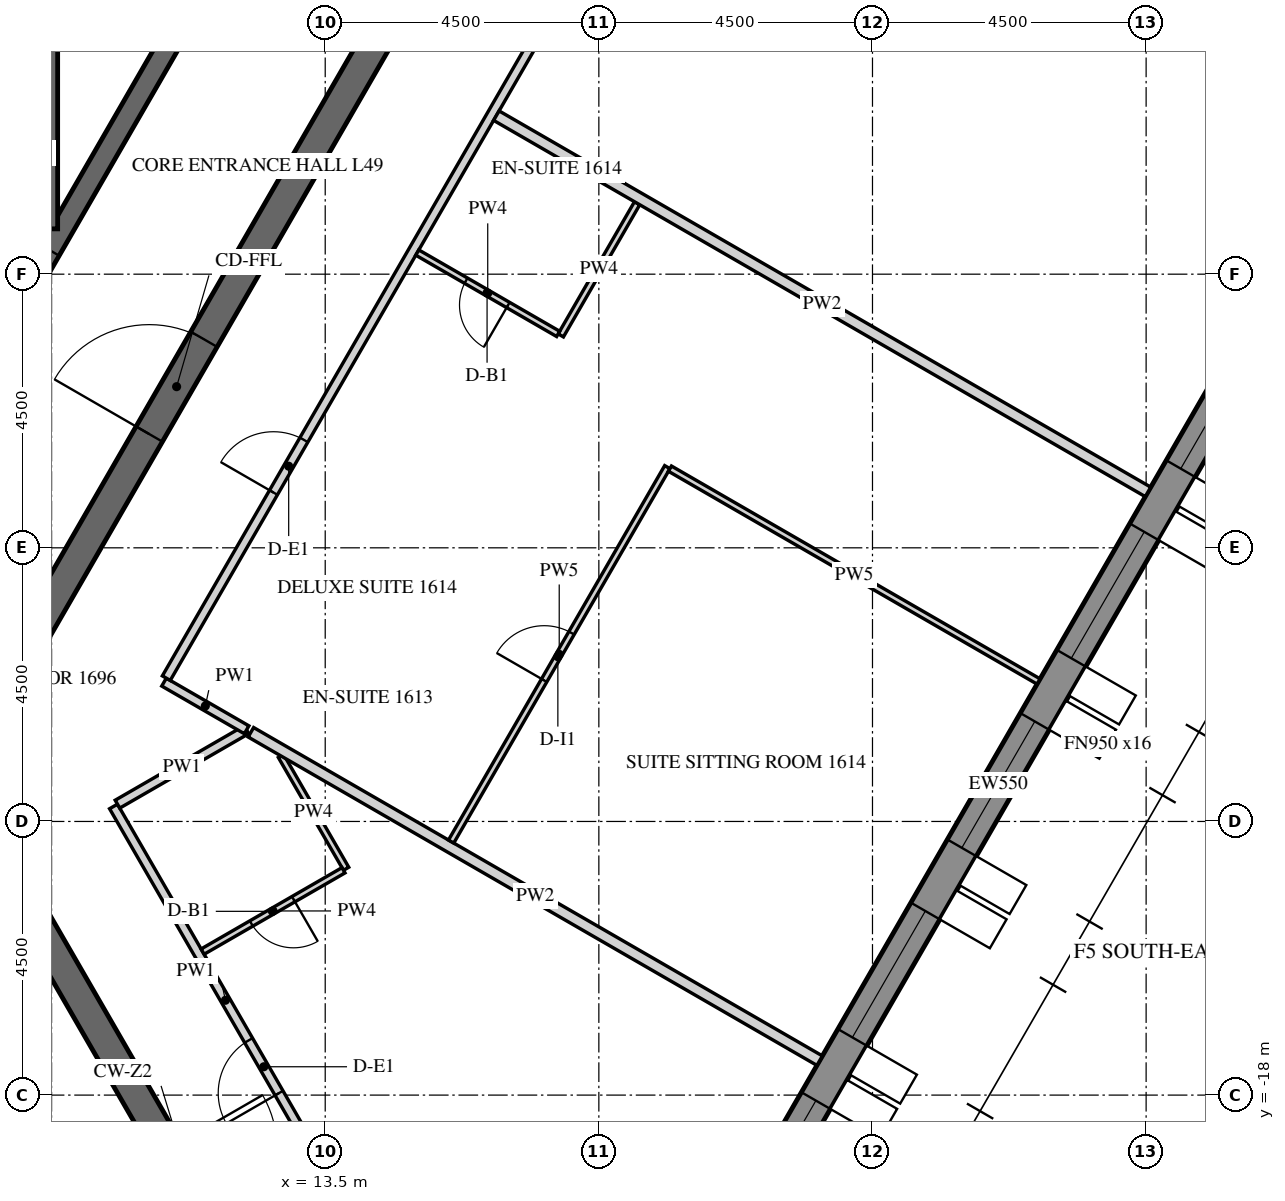
"""IFC4 building model, lengths in metres.
Left out: names, types, materials, properties, quantities, classifications, styles, units other than length and angle.
Written with IfcOpenShell. Run it as: python <this file> out.ifc"""

import sys

from ifc_helpers import new_model, si_unit, direction, frame, frame_2d, origin, place, context, subcontext, project, spatial, polyline, rectangle, outline, extrude, element, fill, save


model = new_model("IFC4")
c1 = context("Model", 3, precision=1e-05, world=origin(), true_north=direction((0.0, 1.0)))
c2 = subcontext(c1, "Body", "Model", "MODEL_VIEW")
j1 = project(units=[si_unit("LENGTHUNIT", "METRE"), si_unit("PLANEANGLEUNIT", "RADIAN")], contexts=[c1])
p1 = place(None, origin())
s1 = spatial("IfcSite", under=j1, at=p1, CompositionType="ELEMENT")
p2 = place(p1, origin())
s2 = spatial("IfcBuilding", under=s1, at=p2, CompositionType="ELEMENT")
p3 = place(p2, frame((0.0, 0.0, 207.3)))
s3 = spatial("IfcBuildingStorey", under=s2, at=p3, CompositionType="ELEMENT", Elevation=207.3)
p4 = place(p3, frame((17.63, -24.914, -0.15), z_axis=(0.0, 0.0, 1.0), x_axis=(0.499998569178, 0.866026229868, 0.0)))
e1 = element("IfcWall", 1, at=p4, inside=s3, PredefinedType="SOLIDWALL", context=c2, shape_type="SweptSolid", body=[
    extrude(outline(polyline([(-0.022, -0.275), (27.783, -0.275), (27.732, 0.275), (0.022, 0.275), (-0.022, -0.275)])), origin(), (0.0, 0.0, 1.0), 3.9),
])
p5 = place(p4, frame((1.879, 0.0, 1.05)))
e2 = element("IfcOpeningElement", 2, at=p5, cuts=e1, PredefinedType="OPENING", context=c2, shape_type="SweptSolid", body=[
    extrude(rectangle(XDim=2.4, YDim=2.4, at=frame_2d((1.2, 1.2))), frame((0.0, 0.285, 0.0), z_axis=(0.0, -1.0, 0.0), x_axis=(1.0, 0.0, 0.0)), (0.0, 0.0, 1.0), 0.57),
])
p6 = place(p4, frame((5.479, 0.0, 1.05)))
e3 = element("IfcOpeningElement", 3, at=p6, cuts=e1, PredefinedType="OPENING", context=c2, shape_type="SweptSolid", body=[
    extrude(rectangle(XDim=2.4, YDim=2.4, at=frame_2d((1.2, 1.2))), frame((0.0, 0.285, 0.0), z_axis=(0.0, -1.0, 0.0), x_axis=(1.0, 0.0, 0.0)), (0.0, 0.0, 1.0), 0.57),
])
p7 = place(p4, frame((9.079, 0.0, 1.05)))
e4 = element("IfcOpeningElement", 4, at=p7, cuts=e1, PredefinedType="OPENING", context=c2, shape_type="SweptSolid", body=[
    extrude(rectangle(XDim=2.4, YDim=2.4, at=frame_2d((1.2, 1.2))), frame((0.0, 0.285, 0.0), z_axis=(0.0, -1.0, 0.0), x_axis=(1.0, 0.0, 0.0)), (0.0, 0.0, 1.0), 0.57),
])
p8 = place(p4, frame((12.679, 0.0, 1.05)))
e5 = element("IfcOpeningElement", 5, at=p8, cuts=e1, PredefinedType="OPENING", context=c2, shape_type="SweptSolid", body=[
    extrude(rectangle(XDim=2.4, YDim=2.4, at=frame_2d((1.2, 1.2))), frame((0.0, 0.285, 0.0), z_axis=(0.0, -1.0, 0.0), x_axis=(1.0, 0.0, 0.0)), (0.0, 0.0, 1.0), 0.57),
])
p9 = place(p4, frame((16.279, 0.0, 1.05)))
e6 = element("IfcOpeningElement", 6, at=p9, cuts=e1, PredefinedType="OPENING", context=c2, shape_type="SweptSolid", body=[
    extrude(rectangle(XDim=2.4, YDim=2.4, at=frame_2d((1.2, 1.2))), frame((0.0, 0.285, 0.0), z_axis=(0.0, -1.0, 0.0), x_axis=(1.0, 0.0, 0.0)), (0.0, 0.0, 1.0), 0.57),
])
p10 = place(p4, frame((19.879, 0.0, 1.05)))
e7 = element("IfcOpeningElement", 7, at=p10, cuts=e1, PredefinedType="OPENING", context=c2, shape_type="SweptSolid", body=[
    extrude(rectangle(XDim=2.4, YDim=2.4, at=frame_2d((1.2, 1.2))), frame((0.0, 0.285, 0.0), z_axis=(0.0, -1.0, 0.0), x_axis=(1.0, 0.0, 0.0)), (0.0, 0.0, 1.0), 0.57),
])
p11 = place(p4, frame((23.479, 0.0, 1.05)))
e8 = element("IfcOpeningElement", 8, at=p11, cuts=e1, PredefinedType="OPENING", context=c2, shape_type="SweptSolid", body=[
    extrude(rectangle(XDim=2.4, YDim=2.4, at=frame_2d((1.2, 1.2))), frame((0.0, 0.285, 0.0), z_axis=(0.0, -1.0, 0.0), x_axis=(1.0, 0.0, 0.0)), (0.0, 0.0, 1.0), 0.57),
])
p12 = place(p3, frame((7.361, -12.75, -0.15), z_axis=(0.0, 0.0, 1.0), x_axis=(0.50000571537, 0.866022103989, 0.0)))
e9 = element("IfcWall", 9, at=p12, inside=s3, PredefinedType="SHEAR", context=c2, shape_type="SweptSolid", body=[
    extrude(outline(polyline([(-0.144, -0.25), (14.867, -0.25), (14.578, 0.25), (0.144, 0.25), (-0.144, -0.25)])), origin(), (0.0, 0.0, 1.0), 3.9),
])
p13 = place(p12, frame((6.49, 0.0, 0.15)))
e10 = element("IfcOpeningElement", 10, at=p13, cuts=e9, PredefinedType="OPENING", context=c2, shape_type="SweptSolid", body=[
    extrude(rectangle(XDim=1.8, YDim=2.4, at=frame_2d((0.9, 1.2))), frame((0.0, 0.26, 0.0), z_axis=(0.0, -1.0, 0.0), x_axis=(1.0, 0.0, 0.0)), (0.0, 0.0, 1.0), 0.52),
])
p14 = place(p3, frame((7.506, -13.0, -0.15), z_axis=(0.0, 0.0, 1.0), x_axis=(0.499988271576, -0.866032175087, 0.0)))
e11 = element("IfcWall", 11, at=p14, inside=s3, PredefinedType="SHEAR", context=c2, shape_type="SweptSolid", body=[
    extrude(rectangle(XDim=15.424, YDim=0.5, at=frame_2d((7.712, 0.0))), origin(), (0.0, 0.0, 1.0), 3.9),
])
p15 = place(p14, frame((6.812, 0.0, 0.15)))
e12 = element("IfcOpeningElement", 12, at=p15, cuts=e11, PredefinedType="OPENING", context=c2, shape_type="SweptSolid", body=[
    extrude(rectangle(XDim=1.8, YDim=2.4, at=frame_2d((0.9, 1.2))), frame((0.0, 0.26, 0.0), z_axis=(0.0, -1.0, 0.0), x_axis=(1.0, 0.0, 0.0)), (0.0, 0.0, 1.0), 0.52),
])
p16 = place(p3, frame((5.673, -9.825, -0.15), z_axis=(0.0, 0.0, 1.0), x_axis=(0.499995046907, 0.866028263435, 0.0)))
e13 = element("IfcWall", 13, at=p16, inside=s3, PredefinedType="SHEAR", context=c2, shape_type="SweptSolid", body=[
    extrude(outline(polyline([(-0.101, -0.175), (11.446, -0.175), (11.244, 0.175), (0.101, 0.175), (-0.101, -0.175)])), origin(), (0.0, 0.0, 1.0), 3.9),
])
p17 = place(p16, frame((4.801, 0.0, 0.15)))
e14 = element("IfcOpeningElement", 14, at=p17, cuts=e13, PredefinedType="OPENING", context=c2, shape_type="SweptSolid", body=[
    extrude(rectangle(XDim=1.8, YDim=2.4, at=frame_2d((0.9, 1.2))), frame((0.0, 0.185, 0.0), z_axis=(0.0, -1.0, 0.0), x_axis=(1.0, 0.0, 0.0)), (0.0, 0.0, 1.0), 0.37),
])
p18 = place(p3, frame((8.975, -3.755, -0.25), z_axis=(0.0, 0.0, 1.0), x_axis=(0.0, 1.0, 0.0)))
e15 = element("IfcWall", 15, at=p18, inside=s3, PredefinedType="SHEAR", context=c2, shape_type="SweptSolid", body=[
    extrude(rectangle(XDim=7.51, YDim=0.25, at=frame_2d((3.755, 0.0))), origin(), (0.0, 0.0, 1.0), 3.9),
])
p19 = place(p3, frame((6.293, -15.0, 0.0), z_axis=(0.0, 0.0, 1.0), x_axis=(0.499980313799, -0.86603676932, 0.0)))
e16 = element("IfcWall", 16, at=p19, inside=s3, PredefinedType="PARTITIONING", context=c2, shape_type="SweptSolid", body=[
    extrude(rectangle(XDim=7.786, YDim=0.15, at=frame_2d((3.893, 0.0))), origin(), (0.0, 0.0, 1.0), 2.988),
])
p20 = place(p3, frame((13.699, -19.628, 0.0), z_axis=(0.0, 0.0, 1.0), x_axis=(-0.499995202058, 0.86602817386, 0.0)))
e17 = element("IfcWall", 17, at=p20, inside=s3, PredefinedType="PARTITIONING", context=c2, shape_type="SweptSolid", body=[
    extrude(rectangle(XDim=7.361, YDim=0.15, at=frame_2d((3.68, 0.0))), origin(), (0.0, 0.0, 1.0), 2.988),
])
p21 = place(p20, frame((1.918, 0.0, 0.0)))
e18 = element("IfcOpeningElement", 18, at=p21, cuts=e17, PredefinedType="OPENING", context=c2, shape_type="SweptSolid", body=[
    extrude(rectangle(XDim=1.0, YDim=2.1, at=frame_2d((0.5, 1.05))), frame((0.0, 0.085, 0.0), z_axis=(0.0, -1.0, 0.0), x_axis=(1.0, 0.0, 0.0)), (0.0, 0.0, 1.0), 0.17),
])
p22 = place(p3, frame((10.084, -13.216, 0.0), z_axis=(0.0, 0.0, 1.0), x_axis=(0.866026229868, 0.499998569178, 0.0)))
e19 = element("IfcWall", 19, at=p22, inside=s3, PredefinedType="PARTITIONING", context=c2, shape_type="SweptSolid", body=[
    extrude(rectangle(XDim=2.449, YDim=0.15, at=frame_2d((1.225, 0.0))), origin(), (0.0, 0.0, 1.0), 2.988),
])
p23 = place(p3, frame((12.208, -11.993, 0.0), z_axis=(0.0, 0.0, 1.0), x_axis=(-0.866011891242, 0.50002340368, 0.0)))
e20 = element("IfcWall", 20, at=p23, inside=s3, PredefinedType="PARTITIONING", context=c2, shape_type="SweptSolid", body=[
    extrude(rectangle(XDim=1.568, YDim=0.15, at=frame_2d((0.784, 0.0))), origin(), (0.0, 0.0, 1.0), 2.988),
])
p24 = place(p3, frame((10.887, -11.144, 0.0), z_axis=(0.0, 0.0, 1.0), x_axis=(0.500006037985, 0.866021917724, 0.0)))
e21 = element("IfcWall", 21, at=p24, inside=s3, PredefinedType="PARTITIONING", context=c2, shape_type="SweptSolid", body=[
    extrude(rectangle(XDim=12.867, YDim=0.15, at=frame_2d((6.434, 0.0))), origin(), (0.0, 0.0, 1.0), 2.988),
])
p25 = place(p24, frame((3.525, 0.0, 0.0)))
e22 = element("IfcOpeningElement", 22, at=p25, cuts=e21, PredefinedType="OPENING", context=c2, shape_type="SweptSolid", body=[
    extrude(rectangle(XDim=1.0, YDim=2.1, at=frame_2d((0.5, 1.05))), frame((0.0, 0.085, 0.0), z_axis=(0.0, -1.0, 0.0), x_axis=(1.0, 0.0, 0.0)), (0.0, 0.0, 1.0), 0.17),
])
p26 = place(p3, frame((12.772, -12.423, 0.0), z_axis=(0.0, 0.0, 1.0), x_axis=(0.500061136393, -0.865990103794, 0.0)))
e23 = element("IfcWall", 23, at=p26, inside=s3, PredefinedType="PARTITIONING", context=c2, shape_type="SweptSolid", body=[
    extrude(rectangle(XDim=2.142, YDim=0.1, at=frame_2d((1.071, 0.0))), origin(), (0.0, 0.0, 1.0), 2.988),
])
p27 = place(p3, frame((13.8, -14.303, 0.0), z_axis=(0.0, 0.0, 1.0), x_axis=(-0.866021425885, -0.500006889861, 0.0)))
e24 = element("IfcWall", 24, at=p27, inside=s3, PredefinedType="PARTITIONING", context=c2, shape_type="SweptSolid", body=[
    extrude(rectangle(XDim=2.675, YDim=0.1, at=frame_2d((1.337, 0.0))), origin(), (0.0, 0.0, 1.0), 2.988),
])
p28 = place(p27, frame((0.95, 0.0, 0.0)))
e25 = element("IfcOpeningElement", 25, at=p28, cuts=e24, PredefinedType="OPENING", context=c2, shape_type="SweptSolid", body=[
    extrude(rectangle(XDim=0.8, YDim=2.1, at=frame_2d((0.4, 1.05))), frame((0.0, 0.06, 0.0), z_axis=(0.0, -1.0, 0.0), x_axis=(1.0, 0.0, 0.0)), (0.0, 0.0, 1.0), 0.12),
])
p29 = place(p3, frame((21.631, -17.433, 0.0), z_axis=(0.0, 0.0, 1.0), x_axis=(-0.866029744906, 0.499992480882, 0.0)))
e26 = element("IfcWall", 26, at=p29, inside=s3, PredefinedType="PARTITIONING", context=c2, shape_type="SweptSolid", body=[
    extrude(rectangle(XDim=10.801, YDim=0.18, at=frame_2d((5.4, 0.0))), origin(), (0.0, 0.0, 1.0), 2.988),
])
p30 = place(p3, frame((18.629, -3.333, 0.0), z_axis=(0.0, 0.0, 1.0), x_axis=(-0.499946979623, -0.86605601295, 0.0)))
e27 = element("IfcWall", 27, at=p30, inside=s3, PredefinedType="PARTITIONING", context=c2, shape_type="SweptSolid", body=[
    extrude(rectangle(XDim=2.51, YDim=0.1, at=frame_2d((1.255, 0.0))), origin(), (0.0, 0.0, 1.0), 2.988),
])
p31 = place(p3, frame((17.331, -5.482, 0.0), z_axis=(0.0, 0.0, 1.0), x_axis=(-0.86604424267, 0.499967368674, 0.0)))
e28 = element("IfcWall", 28, at=p31, inside=s3, PredefinedType="PARTITIONING", context=c2, shape_type="SweptSolid", body=[
    extrude(rectangle(XDim=2.675, YDim=0.1, at=frame_2d((1.337, 0.0))), origin(), (0.0, 0.0, 1.0), 2.988),
])
p32 = place(p31, frame((0.95, 0.0, 0.0)))
e29 = element("IfcOpeningElement", 29, at=p32, cuts=e28, PredefinedType="OPENING", context=c2, shape_type="SweptSolid", body=[
    extrude(rectangle(XDim=0.8, YDim=2.1, at=frame_2d((0.4, 1.05))), frame((0.0, 0.06, 0.0), z_axis=(0.0, -1.0, 0.0), x_axis=(1.0, 0.0, 0.0)), (0.0, 0.0, 1.0), 0.12),
])
p33 = place(p3, frame((15.571, -13.831, 0.0), z_axis=(0.0, 0.0, 1.0), x_axis=(0.5000167099, 0.866015756104, 0.0)))
e30 = element("IfcWall", 30, at=p33, inside=s3, PredefinedType="PARTITIONING", context=c2, shape_type="SweptSolid", body=[
    extrude(rectangle(XDim=7.11, YDim=0.1, at=frame_2d((3.555, 0.0))), origin(), (0.0, 0.0, 1.0), 2.988),
])
p34 = place(p33, frame((3.06, 0.0, 0.0)))
e31 = element("IfcOpeningElement", 31, at=p34, cuts=e30, PredefinedType="OPENING", context=c2, shape_type="SweptSolid", body=[
    extrude(rectangle(XDim=0.9, YDim=2.1, at=frame_2d((0.45, 1.05))), frame((0.0, 0.06, 0.0), z_axis=(0.0, -1.0, 0.0), x_axis=(1.0, 0.0, 0.0)), (0.0, 0.0, 1.0), 0.12),
])
p35 = place(p3, frame((19.169, -7.698, 0.0), z_axis=(0.0, 0.0, 1.0), x_axis=(0.866028190633, -0.499995173006, 0.0)))
e32 = element("IfcWall", 32, at=p35, inside=s3, PredefinedType="PARTITIONING", context=c2, shape_type="SweptSolid", body=[
    extrude(rectangle(XDim=7.0, YDim=0.1, at=frame_2d((3.5, 0.0))), origin(), (0.0, 0.0, 1.0), 2.988),
])
p36 = place(p3, frame((27.031, -8.08, 0.0), z_axis=(0.0, 0.0, 1.0), x_axis=(-0.866024931941, 0.500000817256, 0.0)))
e33 = element("IfcWall", 33, at=p36, inside=s3, PredefinedType="PARTITIONING", context=c2, shape_type="SweptSolid", body=[
    extrude(rectangle(XDim=12.375, YDim=0.18, at=frame_2d((6.188, 0.0))), origin(), (0.0, 0.0, 1.0), 2.988),
])
p37 = place(p6, frame((0.0, 0.205, 0.0)))
e34 = element("IfcWindow", 34, at=p37, inside=s3, PartitioningType="DOUBLE_PANEL_VERTICAL", PredefinedType="WINDOW", context=c2, shape_type="SweptSolid", body=[
    extrude(rectangle(XDim=2.4, YDim=2.4, at=frame_2d((1.2, 1.2))), frame((0.0, 0.03, 0.0), z_axis=(0.0, -1.0, 0.0), x_axis=(1.0, 0.0, 0.0)), (0.0, 0.0, 1.0), 0.06),
])
fill(e3, e34)
p38 = place(p7, frame((0.0, 0.205, 0.0)))
e35 = element("IfcWindow", 35, at=p38, inside=s3, PartitioningType="DOUBLE_PANEL_VERTICAL", PredefinedType="WINDOW", context=c2, shape_type="SweptSolid", body=[
    extrude(rectangle(XDim=2.4, YDim=2.4, at=frame_2d((1.2, 1.2))), frame((0.0, 0.03, 0.0), z_axis=(0.0, -1.0, 0.0), x_axis=(1.0, 0.0, 0.0)), (0.0, 0.0, 1.0), 0.06),
])
fill(e4, e35)
p39 = place(p8, frame((0.0, 0.205, 0.0)))
e36 = element("IfcWindow", 36, at=p39, inside=s3, PartitioningType="DOUBLE_PANEL_VERTICAL", PredefinedType="WINDOW", context=c2, shape_type="SweptSolid", body=[
    extrude(rectangle(XDim=2.4, YDim=2.4, at=frame_2d((1.2, 1.2))), frame((0.0, 0.03, 0.0), z_axis=(0.0, -1.0, 0.0), x_axis=(1.0, 0.0, 0.0)), (0.0, 0.0, 1.0), 0.06),
])
fill(e5, e36)
p40 = place(p9, frame((0.0, 0.205, 0.0)))
e37 = element("IfcWindow", 37, at=p40, inside=s3, PartitioningType="DOUBLE_PANEL_VERTICAL", PredefinedType="WINDOW", context=c2, shape_type="SweptSolid", body=[
    extrude(rectangle(XDim=2.4, YDim=2.4, at=frame_2d((1.2, 1.2))), frame((0.0, 0.03, 0.0), z_axis=(0.0, -1.0, 0.0), x_axis=(1.0, 0.0, 0.0)), (0.0, 0.0, 1.0), 0.06),
])
fill(e6, e37)
p41 = place(p10, frame((0.0, 0.205, 0.0)))
e38 = element("IfcWindow", 38, at=p41, inside=s3, PartitioningType="DOUBLE_PANEL_VERTICAL", PredefinedType="WINDOW", context=c2, shape_type="SweptSolid", body=[
    extrude(rectangle(XDim=2.4, YDim=2.4, at=frame_2d((1.2, 1.2))), frame((0.0, 0.03, 0.0), z_axis=(0.0, -1.0, 0.0), x_axis=(1.0, 0.0, 0.0)), (0.0, 0.0, 1.0), 0.06),
])
fill(e7, e38)
p42 = place(p13, origin())
e39 = element("IfcDoor", 39, at=p42, inside=s3, OperationType="DOUBLE_DOOR_SINGLE_SWING", PredefinedType="DOOR", context=c2, shape_type="SweptSolid", body=[
    extrude(rectangle(XDim=1.8, YDim=2.4, at=frame_2d((0.9, 1.2))), frame((0.0, 0.025, 0.0), z_axis=(0.0, -1.0, 0.0), x_axis=(1.0, 0.0, 0.0)), (0.0, 0.0, 1.0), 0.05),
])
fill(e10, e39)
p43 = place(p21, origin())
e40 = element("IfcDoor", 40, at=p43, inside=s3, OperationType="SINGLE_SWING_LEFT", PredefinedType="DOOR", context=c2, shape_type="SweptSolid", body=[
    extrude(rectangle(XDim=1.0, YDim=2.1, at=frame_2d((0.5, 1.05))), frame((0.0, 0.025, 0.0), z_axis=(0.0, -1.0, 0.0), x_axis=(1.0, 0.0, 0.0)), (0.0, 0.0, 1.0), 0.05),
])
fill(e18, e40)
p44 = place(p28, origin())
e41 = element("IfcDoor", 41, at=p44, inside=s3, OperationType="SINGLE_SWING_RIGHT", PredefinedType="DOOR", context=c2, shape_type="SweptSolid", body=[
    extrude(rectangle(XDim=0.8, YDim=2.1, at=frame_2d((0.4, 1.05))), frame((0.0, 0.025, 0.0), z_axis=(0.0, -1.0, 0.0), x_axis=(1.0, 0.0, 0.0)), (0.0, 0.0, 1.0), 0.05),
])
fill(e25, e41)
p45 = place(p25, origin())
e42 = element("IfcDoor", 42, at=p45, inside=s3, OperationType="SINGLE_SWING_RIGHT", PredefinedType="DOOR", context=c2, shape_type="SweptSolid", body=[
    extrude(rectangle(XDim=1.0, YDim=2.1, at=frame_2d((0.5, 1.05))), frame((0.0, 0.025, 0.0), z_axis=(0.0, -1.0, 0.0), x_axis=(1.0, 0.0, 0.0)), (0.0, 0.0, 1.0), 0.05),
])
fill(e22, e42)
p46 = place(p32, origin())
e43 = element("IfcDoor", 43, at=p46, inside=s3, OperationType="SINGLE_SWING_LEFT", PredefinedType="DOOR", context=c2, shape_type="SweptSolid", body=[
    extrude(rectangle(XDim=0.8, YDim=2.1, at=frame_2d((0.4, 1.05))), frame((0.0, 0.025, 0.0), z_axis=(0.0, -1.0, 0.0), x_axis=(1.0, 0.0, 0.0)), (0.0, 0.0, 1.0), 0.05),
])
fill(e29, e43)
p47 = place(p34, origin())
e44 = element("IfcDoor", 44, at=p47, inside=s3, OperationType="SINGLE_SWING_RIGHT", PredefinedType="DOOR", context=c2, shape_type="SweptSolid", body=[
    extrude(rectangle(XDim=0.9, YDim=2.1, at=frame_2d((0.45, 1.05))), frame((0.0, 0.025, 0.0), z_axis=(0.0, -1.0, 0.0), x_axis=(1.0, 0.0, 0.0)), (0.0, 0.0, 1.0), 0.05),
])
fill(e31, e44)
save(model, sys.argv[1])
